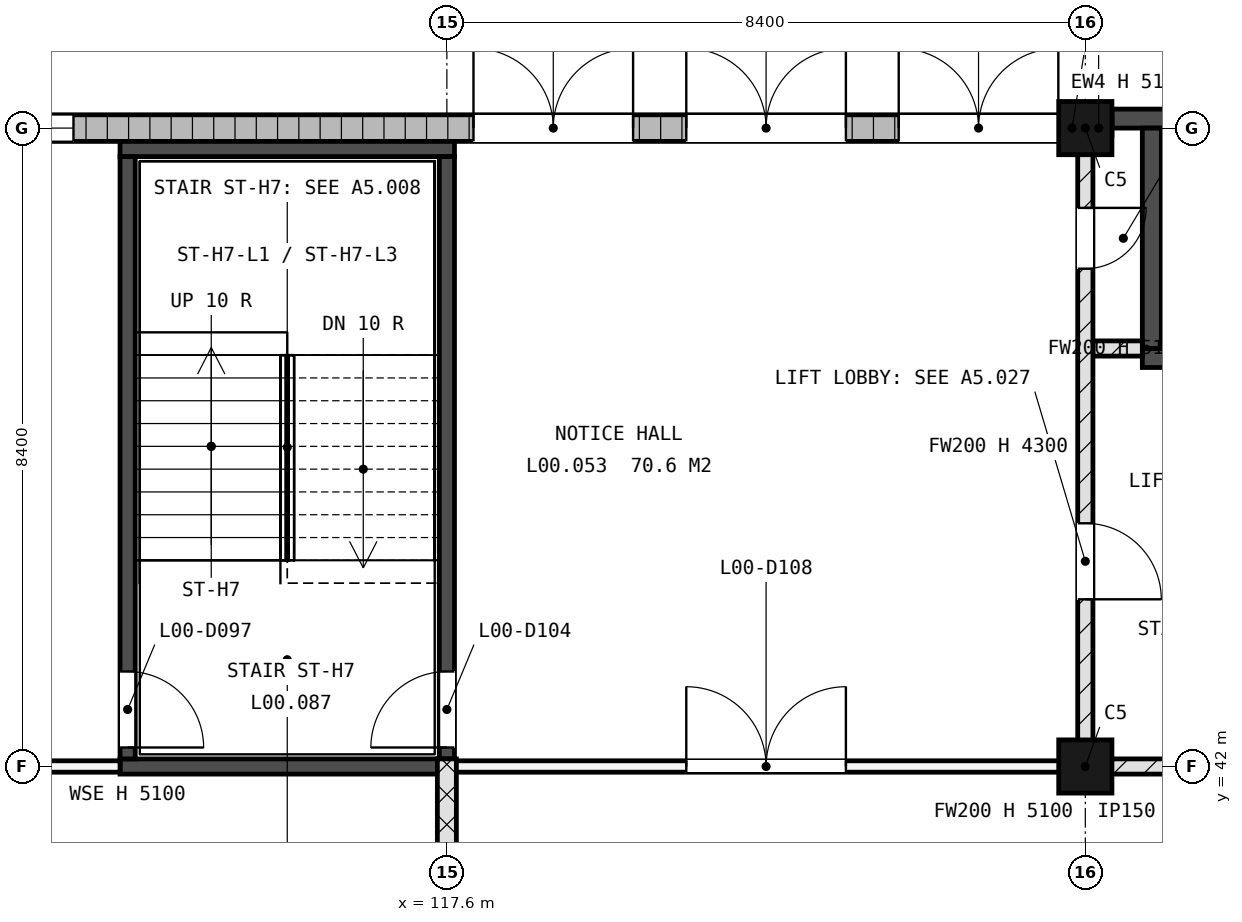
"""IFC4 building model, lengths in metres.
Left out: names, types, materials, properties, quantities, classifications, styles, units other than length and angle.
Written with IfcOpenShell. Run it as: python <this file> out.ifc"""

import sys

from ifc_helpers import new_model, si_unit, direction, frame, frame_2d, origin, origin_2d, place, context, subcontext, project, spatial, rectangle, extrude, element, fill, save


model = new_model("IFC4")
c1 = context("Model", 3, precision=1e-05, world=origin(), true_north=direction((0.0, 1.0)))
c2 = subcontext(c1, "Body", "Model", "MODEL_VIEW")
j1 = project(units=[si_unit("LENGTHUNIT", "METRE"), si_unit("PLANEANGLEUNIT", "RADIAN")], contexts=[c1])
p1 = place(None, origin())
s1 = spatial("IfcSite", under=j1, at=p1, CompositionType="ELEMENT")
p2 = place(p1, origin())
s2 = spatial("IfcBuilding", under=s1, at=p2, CompositionType="ELEMENT")
p3 = place(p2, origin())
s3 = spatial("IfcBuildingStorey", under=s2, at=p3, CompositionType="ELEMENT", Elevation=0.0)
for number, where, z_axis, x_axis in (
    (1, (126.0, 42.0, -0.3), (0.0, 0.0, 1.0), (1.0, 0.0, 0.0)),
    (2, (126.0, 50.4, -0.3), (0.0, 0.0, 1.0), (1.0, 0.0, 0.0)),
):
    element("IfcColumn", number, at=place(p3, frame(where, z_axis=z_axis, x_axis=x_axis)), inside=s3, PredefinedType="COLUMN", context=c2, shape_type="SweptSolid", body=[
        extrude(rectangle(XDim=0.7, YDim=0.7, at=origin_2d()), origin(), (0.0, 0.0, 1.0), 5.4),
    ])
p4 = place(p3, frame((126.75, 47.375, -0.3), z_axis=(0.0, 0.0, 1.0), x_axis=(1.0, 0.0, 0.0)))
e3 = element("IfcWall", 3, at=p4, inside=s3, PredefinedType="SHEAR", context=c2, shape_type="SweptSolid", body=[
    extrude(rectangle(XDim=3.1, YDim=0.25, at=frame_2d((1.55, 0.0))), origin(), (0.0, 0.0, 1.0), 5.4),
])
p5 = place(p4, frame((1.0, 0.0, 0.3)))
e4 = element("IfcOpeningElement", 4, at=p5, cuts=e3, PredefinedType="OPENING", context=c2, shape_type="SweptSolid", body=[
    extrude(rectangle(XDim=1.1, YDim=2.1, at=frame_2d((0.55, 1.05))), frame((0.0, 0.135, 0.0), z_axis=(0.0, -1.0, 0.0), x_axis=(1.0, 0.0, 0.0)), (0.0, 0.0, 1.0), 0.27),
])
p6 = place(p3, frame((126.35, 50.525, -0.3), z_axis=(0.0, 0.0, 1.0), x_axis=(1.0, 0.0, 0.0)))
e5 = element("IfcWall", 5, at=p6, inside=s3, PredefinedType="SHEAR", context=c2, shape_type="SweptSolid", body=[
    extrude(rectangle(XDim=3.5, YDim=0.25, at=frame_2d((1.75, 0.0))), origin(), (0.0, 0.0, 1.0), 5.4),
])
p7 = place(p3, frame((126.875, 47.5, -0.3), z_axis=(0.0, 0.0, 1.0), x_axis=(0.0, 1.0, 0.0)))
e6 = element("IfcWall", 6, at=p7, inside=s3, PredefinedType="SHEAR", context=c2, shape_type="SweptSolid", body=[
    extrude(rectangle(XDim=2.9, YDim=0.25, at=frame_2d((1.45, 0.0))), origin(), (0.0, 0.0, 1.0), 5.4),
])
p8 = place(p3, frame((109.575, 50.4, 0.0), z_axis=(0.0, 0.0, 1.0), x_axis=(1.0, 0.0, 0.0)))
e7 = element("IfcWall", 7, at=p8, inside=s3, PredefinedType="STANDARD", context=c2, shape_type="SweptSolid", body=[
    extrude(rectangle(XDim=16.075, YDim=0.35, at=frame_2d((8.038, 0.0))), origin(), (0.0, 0.0, 1.0), 5.1),
])
p9 = place(p8, frame((8.375, 0.0, 0.0)))
e8 = element("IfcOpeningElement", 8, at=p9, cuts=e7, PredefinedType="OPENING", context=c2, shape_type="SweptSolid", body=[
    extrude(rectangle(XDim=2.1, YDim=2.2, at=frame_2d((1.05, 1.1))), frame((0.0, 0.185, 0.0), z_axis=(0.0, -1.0, 0.0), x_axis=(1.0, 0.0, 0.0)), (0.0, 0.0, 1.0), 0.37),
])
p10 = place(p8, frame((11.175, 0.0, 0.0)))
e9 = element("IfcOpeningElement", 9, at=p10, cuts=e7, PredefinedType="OPENING", context=c2, shape_type="SweptSolid", body=[
    extrude(rectangle(XDim=2.1, YDim=2.2, at=frame_2d((1.05, 1.1))), frame((0.0, 0.185, 0.0), z_axis=(0.0, -1.0, 0.0), x_axis=(1.0, 0.0, 0.0)), (0.0, 0.0, 1.0), 0.37),
])
p11 = place(p8, frame((13.97, 0.0, 0.0)))
e10 = element("IfcOpeningElement", 10, at=p11, cuts=e7, PredefinedType="OPENING", context=c2, shape_type="SweptSolid", body=[
    extrude(rectangle(XDim=2.1, YDim=2.2, at=frame_2d((1.05, 1.1))), frame((0.0, 0.185, 0.0), z_axis=(0.0, -1.0, 0.0), x_axis=(1.0, 0.0, 0.0)), (0.0, 0.0, 1.0), 0.37),
])
p12 = place(p8, frame((0.712, 0.0, 0.9)))
e11 = element("IfcOpeningElement", 11, at=p12, cuts=e7, PredefinedType="OPENING", context=c2, shape_type="SweptSolid", body=[
    extrude(rectangle(XDim=2.4, YDim=1.5, at=frame_2d((1.2, 0.75))), frame((0.0, 0.185, 0.0), z_axis=(0.0, -1.0, 0.0), x_axis=(1.0, 0.0, 0.0)), (0.0, 0.0, 1.0), 0.37),
])
for number, where, z_axis, x_axis in (
    (12, (113.3, 42.0, 0.0), (0.0, 0.0, 1.0), (1.0, 0.0, 0.0)),
    (13, (113.3, 50.125, 0.0), (0.0, 0.0, 1.0), (1.0, 0.0, 0.0)),
):
    element("IfcWall", number, at=place(p3, frame(where, z_axis=z_axis, x_axis=x_axis)), inside=s3, PredefinedType="SHEAR", context=c2, shape_type="SweptSolid", body=[
        extrude(rectangle(XDim=4.4, YDim=0.2, at=frame_2d((2.2, 0.0))), origin(), (0.0, 0.0, 1.0), 5.1),
    ])
p13 = place(p3, frame((113.4, 42.1, 0.0), z_axis=(0.0, 0.0, 1.0), x_axis=(0.0, 1.0, 0.0)))
e14 = element("IfcWall", 14, at=p13, inside=s3, PredefinedType="SHEAR", context=c2, shape_type="SweptSolid", body=[
    extrude(rectangle(XDim=7.925, YDim=0.2, at=frame_2d((3.962, 0.0))), origin(), (0.0, 0.0, 1.0), 5.1),
])
p14 = place(p13, frame((0.15, 0.0, 0.0)))
e15 = element("IfcOpeningElement", 15, at=p14, cuts=e14, PredefinedType="OPENING", context=c2, shape_type="SweptSolid", body=[
    extrude(rectangle(XDim=1.0, YDim=2.1, at=frame_2d((0.5, 1.05))), frame((0.0, 0.11, 0.0), z_axis=(0.0, -1.0, 0.0), x_axis=(1.0, 0.0, 0.0)), (0.0, 0.0, 1.0), 0.22),
])
p15 = place(p3, frame((117.6, 42.1, 0.0), z_axis=(0.0, 0.0, 1.0), x_axis=(0.0, 1.0, 0.0)))
e16 = element("IfcWall", 16, at=p15, inside=s3, PredefinedType="SHEAR", context=c2, shape_type="SweptSolid", body=[
    extrude(rectangle(XDim=7.925, YDim=0.2, at=frame_2d((3.962, 0.0))), origin(), (0.0, 0.0, 1.0), 5.1),
])
p16 = place(p15, frame((0.15, 0.0, 0.0)))
e17 = element("IfcOpeningElement", 17, at=p16, cuts=e16, PredefinedType="OPENING", context=c2, shape_type="SweptSolid", body=[
    extrude(rectangle(XDim=1.0, YDim=2.1, at=frame_2d((0.5, 1.05))), frame((0.0, 0.11, 0.0), z_axis=(0.0, -1.0, 0.0), x_axis=(1.0, 0.0, 0.0)), (0.0, 0.0, 1.0), 0.22),
])
p17 = place(p3, frame((108.845, 42.0, 0.0), z_axis=(0.0, 0.0, 1.0), x_axis=(1.0, 0.0, 0.0)))
e18 = element("IfcWall", 18, at=p17, inside=s3, PredefinedType="PARTITIONING", context=c2, shape_type="SweptSolid", body=[
    extrude(rectangle(XDim=4.455, YDim=0.15, at=frame_2d((2.228, 0.0))), origin(), (0.0, 0.0, 1.0), 5.1),
])
p18 = place(p3, frame((117.7, 42.0, 0.0), z_axis=(0.0, 0.0, 1.0), x_axis=(1.0, 0.0, 0.0)))
e19 = element("IfcWall", 19, at=p18, inside=s3, PredefinedType="PARTITIONING", context=c2, shape_type="SweptSolid", body=[
    extrude(rectangle(XDim=8.3, YDim=0.15, at=frame_2d((4.15, 0.0))), origin(), (0.0, 0.0, 1.0), 5.1),
])
p19 = place(p18, frame((3.05, 0.0, 0.0)))
e20 = element("IfcOpeningElement", 20, at=p19, cuts=e19, PredefinedType="OPENING", context=c2, shape_type="SweptSolid", body=[
    extrude(rectangle(XDim=2.1, YDim=2.1, at=frame_2d((1.05, 1.05))), frame((0.0, 0.085, 0.0), z_axis=(0.0, -1.0, 0.0), x_axis=(1.0, 0.0, 0.0)), (0.0, 0.0, 1.0), 0.17),
])
p20 = place(p3, frame((126.0, 42.0, 0.0), z_axis=(0.0, 0.0, 1.0), x_axis=(1.0, 0.0, 0.0)))
e21 = element("IfcWall", 21, at=p20, inside=s3, PredefinedType="SOLIDWALL", context=c2, shape_type="SweptSolid", body=[
    extrude(rectangle(XDim=4.1, YDim=0.2, at=frame_2d((2.05, 0.0))), origin(), (0.0, 0.0, 1.0), 5.1),
])
p21 = place(p3, frame((126.1, 47.5, 0.0), z_axis=(0.0, 0.0, 1.0), x_axis=(1.0, 0.0, 0.0)))
e22 = element("IfcWall", 22, at=p21, inside=s3, PredefinedType="SOLIDWALL", context=c2, shape_type="SweptSolid", body=[
    extrude(rectangle(XDim=0.65, YDim=0.2, at=frame_2d((0.325, 0.0))), origin(), (0.0, 0.0, 1.0), 5.1),
])
p22 = place(p3, frame((125.65, 50.4, 0.0), z_axis=(0.0, 0.0, 1.0), x_axis=(1.0, 0.0, 0.0)))
e23 = element("IfcWall", 23, at=p22, inside=s3, PredefinedType="PARTITIONING", context=c2, shape_type="SweptSolid", body=[
    extrude(rectangle(XDim=0.35, YDim=0.15, at=frame_2d((0.175, 0.0))), origin(), (0.0, 0.0, 1.0), 5.1),
])
p23 = place(p3, frame((126.0, 50.4, 0.0), z_axis=(0.0, 0.0, 1.0), x_axis=(1.0, 0.0, 0.0)))
e24 = element("IfcWall", 24, at=p23, inside=s3, PredefinedType="SOLIDWALL", context=c2, shape_type="SweptSolid", body=[
    extrude(rectangle(XDim=0.35, YDim=0.2, at=frame_2d((0.175, 0.0))), origin(), (0.0, 0.0, 1.0), 5.1),
])
p24 = place(p3, frame((117.6, 33.245, 0.0), z_axis=(0.0, 0.0, 1.0), x_axis=(0.0, 1.0, 0.0)))
e25 = element("IfcWall", 25, at=p24, inside=s3, PredefinedType="SOLIDWALL", context=c2, shape_type="SweptSolid", body=[
    extrude(rectangle(XDim=8.855, YDim=0.25, at=frame_2d((4.427, 0.0))), origin(), (0.0, 0.0, 1.0), 5.1),
])
p25 = place(p3, frame((126.0, 42.1, 0.0), z_axis=(0.0, 0.0, 1.0), x_axis=(0.0, 1.0, 0.0)))
e26 = element("IfcWall", 26, at=p25, inside=s3, PredefinedType="SOLIDWALL", context=c2, shape_type="SweptSolid", body=[
    extrude(rectangle(XDim=8.2, YDim=0.2, at=frame_2d((4.1, 0.0))), origin(), (0.0, 0.0, 1.0), 4.3),
])
p26 = place(p25, frame((6.45, 0.0, 0.0)))
e27 = element("IfcOpeningElement", 27, at=p26, cuts=e26, PredefinedType="OPENING", context=c2, shape_type="SweptSolid", body=[
    extrude(rectangle(XDim=0.8, YDim=2.1, at=frame_2d((0.4, 1.05))), frame((0.0, 0.11, 0.0), z_axis=(0.0, -1.0, 0.0), x_axis=(1.0, 0.0, 0.0)), (0.0, 0.0, 1.0), 0.22),
])
p27 = place(p25, frame((2.1, 0.0, 0.0)))
e28 = element("IfcOpeningElement", 28, at=p27, cuts=e26, PredefinedType="OPENING", context=c2, shape_type="SweptSolid", body=[
    extrude(rectangle(XDim=1.0, YDim=2.1, at=frame_2d((0.5, 1.05))), frame((0.0, 0.11, 0.0), z_axis=(0.0, -1.0, 0.0), x_axis=(1.0, 0.0, 0.0)), (0.0, 0.0, 1.0), 0.22),
])
p28 = place(p9, origin())
e29 = element("IfcDoor", 29, at=p28, inside=s3, OperationType="SINGLE_SWING_LEFT", PredefinedType="DOOR", context=c2, shape_type="SweptSolid", body=[
    extrude(rectangle(XDim=2.1, YDim=0.013, at=frame_2d((1.05, 0.007))), frame((0.0, 0.115, 0.0), z_axis=(0.0, -1.0, 0.0), x_axis=(1.0, 0.0, 0.0)), (0.0, 0.0, 1.0), 0.23),
    extrude(rectangle(XDim=0.075, YDim=2.112, at=frame_2d((0.038, 1.069))), frame((0.0, 0.125, 0.0), z_axis=(0.0, -1.0, 0.0), x_axis=(1.0, 0.0, 0.0)), (0.0, 0.0, 1.0), 0.25),
    extrude(rectangle(XDim=0.075, YDim=2.112, at=frame_2d((2.062, 1.069))), frame((0.0, 0.125, 0.0), z_axis=(0.0, -1.0, 0.0), x_axis=(1.0, 0.0, 0.0)), (0.0, 0.0, 1.0), 0.25),
    extrude(rectangle(XDim=2.1, YDim=0.075, at=frame_2d((1.05, 2.163))), frame((0.0, 0.115, 0.0), z_axis=(0.0, -1.0, 0.0), x_axis=(1.0, 0.0, 0.0)), (0.0, 0.0, 1.0), 0.23),
    extrude(rectangle(XDim=1.95, YDim=0.3, at=frame_2d((1.05, 0.163))), frame((0.0, 0.02, 0.0), z_axis=(0.0, -1.0, 0.0), x_axis=(1.0, 0.0, 0.0)), (0.0, 0.0, 1.0), 0.04),
    extrude(rectangle(XDim=1.95, YDim=0.12, at=frame_2d((1.05, 2.065))), frame((0.0, 0.02, 0.0), z_axis=(0.0, -1.0, 0.0), x_axis=(1.0, 0.0, 0.0)), (0.0, 0.0, 1.0), 0.04),
    extrude(rectangle(XDim=0.09, YDim=1.692, at=frame_2d((0.12, 1.159))), frame((0.0, 0.025, 0.0), z_axis=(0.0, -1.0, 0.0), x_axis=(1.0, 0.0, 0.0)), (0.0, 0.0, 1.0), 0.05),
    extrude(rectangle(XDim=0.18, YDim=1.692, at=frame_2d((1.05, 1.159))), frame((0.0, 0.025, 0.0), z_axis=(0.0, -1.0, 0.0), x_axis=(1.0, 0.0, 0.0)), (0.0, 0.0, 1.0), 0.05),
    extrude(rectangle(XDim=0.09, YDim=1.692, at=frame_2d((1.98, 1.159))), frame((0.0, 0.025, 0.0), z_axis=(0.0, -1.0, 0.0), x_axis=(1.0, 0.0, 0.0)), (0.0, 0.0, 1.0), 0.05),
    extrude(rectangle(XDim=0.795, YDim=1.692, at=frame_2d((0.562, 1.159))), frame((0.0, 0.012, 0.0), z_axis=(0.0, -1.0, 0.0), x_axis=(1.0, 0.0, 0.0)), (0.0, 0.0, 1.0), 0.024),
    extrude(rectangle(XDim=0.795, YDim=1.692, at=frame_2d((1.538, 1.159))), frame((0.0, 0.012, 0.0), z_axis=(0.0, -1.0, 0.0), x_axis=(1.0, 0.0, 0.0)), (0.0, 0.0, 1.0), 0.024),
])
fill(e8, e29)
p29 = place(p10, origin())
e30 = element("IfcDoor", 30, at=p29, inside=s3, OperationType="SINGLE_SWING_LEFT", PredefinedType="DOOR", context=c2, shape_type="SweptSolid", body=[
    extrude(rectangle(XDim=2.1, YDim=0.013, at=frame_2d((1.05, 0.007))), frame((0.0, 0.115, 0.0), z_axis=(0.0, -1.0, 0.0), x_axis=(1.0, 0.0, 0.0)), (0.0, 0.0, 1.0), 0.23),
    extrude(rectangle(XDim=0.075, YDim=2.112, at=frame_2d((0.038, 1.069))), frame((0.0, 0.125, 0.0), z_axis=(0.0, -1.0, 0.0), x_axis=(1.0, 0.0, 0.0)), (0.0, 0.0, 1.0), 0.25),
    extrude(rectangle(XDim=0.075, YDim=2.112, at=frame_2d((2.062, 1.069))), frame((0.0, 0.125, 0.0), z_axis=(0.0, -1.0, 0.0), x_axis=(1.0, 0.0, 0.0)), (0.0, 0.0, 1.0), 0.25),
    extrude(rectangle(XDim=2.1, YDim=0.075, at=frame_2d((1.05, 2.163))), frame((0.0, 0.115, 0.0), z_axis=(0.0, -1.0, 0.0), x_axis=(1.0, 0.0, 0.0)), (0.0, 0.0, 1.0), 0.23),
    extrude(rectangle(XDim=1.95, YDim=0.3, at=frame_2d((1.05, 0.163))), frame((0.0, 0.02, 0.0), z_axis=(0.0, -1.0, 0.0), x_axis=(1.0, 0.0, 0.0)), (0.0, 0.0, 1.0), 0.04),
    extrude(rectangle(XDim=1.95, YDim=0.12, at=frame_2d((1.05, 2.065))), frame((0.0, 0.02, 0.0), z_axis=(0.0, -1.0, 0.0), x_axis=(1.0, 0.0, 0.0)), (0.0, 0.0, 1.0), 0.04),
    extrude(rectangle(XDim=0.09, YDim=1.692, at=frame_2d((0.12, 1.159))), frame((0.0, 0.025, 0.0), z_axis=(0.0, -1.0, 0.0), x_axis=(1.0, 0.0, 0.0)), (0.0, 0.0, 1.0), 0.05),
    extrude(rectangle(XDim=0.18, YDim=1.692, at=frame_2d((1.05, 1.159))), frame((0.0, 0.025, 0.0), z_axis=(0.0, -1.0, 0.0), x_axis=(1.0, 0.0, 0.0)), (0.0, 0.0, 1.0), 0.05),
    extrude(rectangle(XDim=0.09, YDim=1.692, at=frame_2d((1.98, 1.159))), frame((0.0, 0.025, 0.0), z_axis=(0.0, -1.0, 0.0), x_axis=(1.0, 0.0, 0.0)), (0.0, 0.0, 1.0), 0.05),
    extrude(rectangle(XDim=0.795, YDim=1.692, at=frame_2d((0.562, 1.159))), frame((0.0, 0.012, 0.0), z_axis=(0.0, -1.0, 0.0), x_axis=(1.0, 0.0, 0.0)), (0.0, 0.0, 1.0), 0.024),
    extrude(rectangle(XDim=0.795, YDim=1.692, at=frame_2d((1.538, 1.159))), frame((0.0, 0.012, 0.0), z_axis=(0.0, -1.0, 0.0), x_axis=(1.0, 0.0, 0.0)), (0.0, 0.0, 1.0), 0.024),
])
fill(e9, e30)
p30 = place(p11, origin())
e31 = element("IfcDoor", 31, at=p30, inside=s3, OperationType="SINGLE_SWING_LEFT", PredefinedType="DOOR", context=c2, shape_type="SweptSolid", body=[
    extrude(rectangle(XDim=2.1, YDim=0.013, at=frame_2d((1.05, 0.007))), frame((0.0, 0.115, 0.0), z_axis=(0.0, -1.0, 0.0), x_axis=(1.0, 0.0, 0.0)), (0.0, 0.0, 1.0), 0.23),
    extrude(rectangle(XDim=0.075, YDim=2.112, at=frame_2d((0.038, 1.069))), frame((0.0, 0.125, 0.0), z_axis=(0.0, -1.0, 0.0), x_axis=(1.0, 0.0, 0.0)), (0.0, 0.0, 1.0), 0.25),
    extrude(rectangle(XDim=0.075, YDim=2.112, at=frame_2d((2.062, 1.069))), frame((0.0, 0.125, 0.0), z_axis=(0.0, -1.0, 0.0), x_axis=(1.0, 0.0, 0.0)), (0.0, 0.0, 1.0), 0.25),
    extrude(rectangle(XDim=2.1, YDim=0.075, at=frame_2d((1.05, 2.163))), frame((0.0, 0.115, 0.0), z_axis=(0.0, -1.0, 0.0), x_axis=(1.0, 0.0, 0.0)), (0.0, 0.0, 1.0), 0.23),
    extrude(rectangle(XDim=1.95, YDim=0.3, at=frame_2d((1.05, 0.163))), frame((0.0, 0.02, 0.0), z_axis=(0.0, -1.0, 0.0), x_axis=(1.0, 0.0, 0.0)), (0.0, 0.0, 1.0), 0.04),
    extrude(rectangle(XDim=1.95, YDim=0.12, at=frame_2d((1.05, 2.065))), frame((0.0, 0.02, 0.0), z_axis=(0.0, -1.0, 0.0), x_axis=(1.0, 0.0, 0.0)), (0.0, 0.0, 1.0), 0.04),
    extrude(rectangle(XDim=0.09, YDim=1.692, at=frame_2d((0.12, 1.159))), frame((0.0, 0.025, 0.0), z_axis=(0.0, -1.0, 0.0), x_axis=(1.0, 0.0, 0.0)), (0.0, 0.0, 1.0), 0.05),
    extrude(rectangle(XDim=0.18, YDim=1.692, at=frame_2d((1.05, 1.159))), frame((0.0, 0.025, 0.0), z_axis=(0.0, -1.0, 0.0), x_axis=(1.0, 0.0, 0.0)), (0.0, 0.0, 1.0), 0.05),
    extrude(rectangle(XDim=0.09, YDim=1.692, at=frame_2d((1.98, 1.159))), frame((0.0, 0.025, 0.0), z_axis=(0.0, -1.0, 0.0), x_axis=(1.0, 0.0, 0.0)), (0.0, 0.0, 1.0), 0.05),
    extrude(rectangle(XDim=0.795, YDim=1.692, at=frame_2d((0.562, 1.159))), frame((0.0, 0.012, 0.0), z_axis=(0.0, -1.0, 0.0), x_axis=(1.0, 0.0, 0.0)), (0.0, 0.0, 1.0), 0.024),
    extrude(rectangle(XDim=0.795, YDim=1.692, at=frame_2d((1.538, 1.159))), frame((0.0, 0.012, 0.0), z_axis=(0.0, -1.0, 0.0), x_axis=(1.0, 0.0, 0.0)), (0.0, 0.0, 1.0), 0.024),
])
fill(e10, e31)
p31 = place(p12, origin())
e32 = element("IfcWindow", 32, at=p31, inside=s3, PartitioningType="SINGLE_PANEL", PredefinedType="WINDOW", context=c2, shape_type="SweptSolid", body=[
    extrude(rectangle(XDim=2.4, YDim=1.5, at=frame_2d((1.2, 0.75))), frame((0.0, 0.03, 0.0), z_axis=(0.0, -1.0, 0.0), x_axis=(1.0, 0.0, 0.0)), (0.0, 0.0, 1.0), 0.06),
])
fill(e11, e32)
p32 = place(p16, origin())
e33 = element("IfcDoor", 33, at=p32, inside=s3, OperationType="SINGLE_SWING_RIGHT", PredefinedType="DOOR", context=c2, shape_type="SweptSolid", body=[
    extrude(rectangle(XDim=1.0, YDim=2.1, at=frame_2d((0.5, 1.05))), frame((0.0, 0.025, 0.0), z_axis=(0.0, -1.0, 0.0), x_axis=(1.0, 0.0, 0.0)), (0.0, 0.0, 1.0), 0.05),
])
fill(e17, e33)
p33 = place(p14, origin())
e34 = element("IfcDoor", 34, at=p33, inside=s3, OperationType="SINGLE_SWING_LEFT", PredefinedType="DOOR", context=c2, shape_type="SweptSolid", body=[
    extrude(rectangle(XDim=1.0, YDim=2.1, at=frame_2d((0.5, 1.05))), frame((0.0, 0.025, 0.0), z_axis=(0.0, -1.0, 0.0), x_axis=(1.0, 0.0, 0.0)), (0.0, 0.0, 1.0), 0.05),
])
fill(e15, e34)
p34 = place(p19, origin())
e35 = element("IfcDoor", 35, at=p34, inside=s3, OperationType="DOUBLE_DOOR_SINGLE_SWING", PredefinedType="DOOR", context=c2, shape_type="SweptSolid", body=[
    extrude(rectangle(XDim=2.1, YDim=2.1, at=frame_2d((1.05, 1.05))), frame((0.0, 0.025, 0.0), z_axis=(0.0, -1.0, 0.0), x_axis=(1.0, 0.0, 0.0)), (0.0, 0.0, 1.0), 0.05),
])
fill(e20, e35)
p35 = place(p26, origin())
e36 = element("IfcDoor", 36, at=p35, inside=s3, OperationType="SINGLE_SWING_RIGHT", PredefinedType="DOOR", context=c2, shape_type="SweptSolid", body=[
    extrude(rectangle(XDim=0.8, YDim=2.1, at=frame_2d((0.4, 1.05))), frame((0.0, 0.025, 0.0), z_axis=(0.0, -1.0, 0.0), x_axis=(1.0, 0.0, 0.0)), (0.0, 0.0, 1.0), 0.05),
])
fill(e27, e36)
p36 = place(p27, origin())
e37 = element("IfcDoor", 37, at=p36, inside=s3, OperationType="SINGLE_SWING_LEFT", PredefinedType="DOOR", context=c2, shape_type="SweptSolid", body=[
    extrude(rectangle(XDim=1.0, YDim=2.1, at=frame_2d((0.5, 1.05))), frame((0.0, 0.025, 0.0), z_axis=(0.0, -1.0, 0.0), x_axis=(1.0, 0.0, 0.0)), (0.0, 0.0, 1.0), 0.05),
])
fill(e28, e37)
save(model, sys.argv[1])
